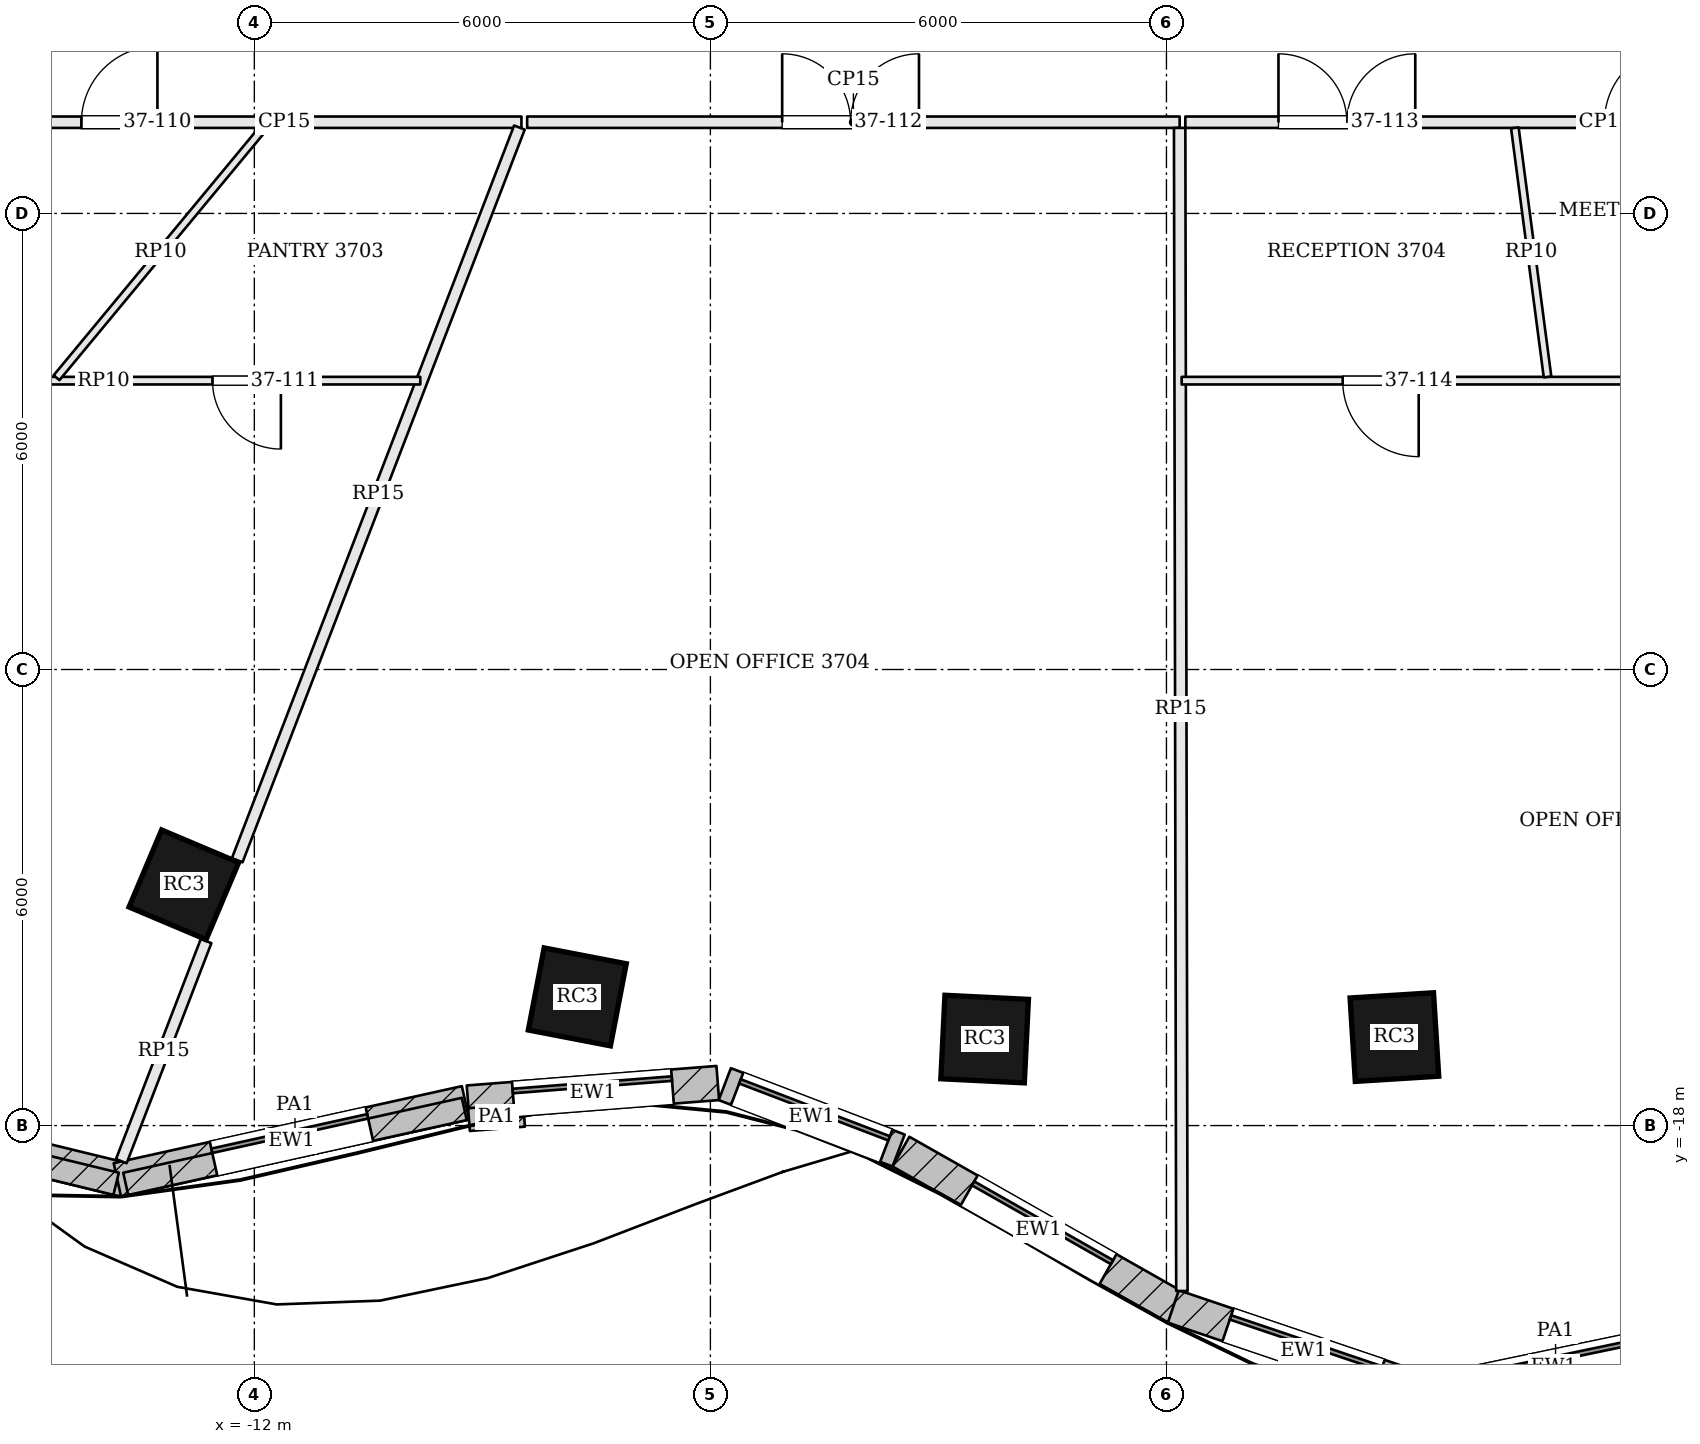
"""IFC4 building model, lengths in metres.
Left out: names, types, materials, properties, quantities, classifications, styles, units other than length and angle.
Written with IfcOpenShell. Run it as: python <this file> out.ifc"""

import sys

from ifc_helpers import new_model, si_unit, direction, frame, frame_2d, origin, origin_2d, place, context, subcontext, project, spatial, rectangle, extrude, element, fill, save


model = new_model("IFC4")
c1 = context("Model", 3, precision=1e-05, world=origin(), true_north=direction((0.0, 1.0)))
c2 = subcontext(c1, "Body", "Model", "MODEL_VIEW")
j1 = project(units=[si_unit("LENGTHUNIT", "METRE"), si_unit("PLANEANGLEUNIT", "RADIAN")], contexts=[c1])
p1 = place(None, origin())
s1 = spatial("IfcSite", under=j1, at=p1, CompositionType="ELEMENT")
p2 = place(p1, origin())
s2 = spatial("IfcBuilding", under=s1, at=p2, CompositionType="ELEMENT")
p3 = place(p2, frame((0.0, 0.0, 153.9)))
s3 = spatial("IfcBuildingStorey", under=s2, at=p3, CompositionType="ELEMENT", Elevation=153.9)
for number, where, z_axis, x_axis in (
    (1, (-12.927, -14.832, 0.0), (0.0, 0.0, 1.0), (0.921, -0.389, 0.0)),
    (2, (-7.751, -16.307, 0.0), (0.0, 0.0, 1.0), (0.982, -0.189, 0.0)),
    (3, (-2.392, -16.862, 0.0), (0.0, 0.0, 1.0), (0.999, -0.049, 0.0)),
    (4, (2.999, -16.836, 0.0), (0.0, 0.0, 1.0), (0.998, 0.062, 0.0)),
):
    element("IfcColumn", number, at=place(p3, frame(where, z_axis=z_axis, x_axis=x_axis)), inside=s3, PredefinedType="COLUMN", context=c2, shape_type="SweptSolid", body=[
        extrude(rectangle(XDim=1.1, YDim=1.1, at=origin_2d()), origin(), (0.0, 0.0, 1.0), 3.9),
    ])
p4 = place(p3, frame((-17.867, -17.701, 0.0), z_axis=(0.0, 0.0, 1.0), x_axis=(0.971546885012, -0.236847314156, 0.0)))
e5 = element("IfcWall", 5, at=p4, inside=s3, PredefinedType="SOLIDWALL", context=c2, shape_type="SweptSolid", body=[
    extrude(rectangle(XDim=4.285, YDim=0.45, at=frame_2d((2.143, 0.0))), origin(), (0.0, 0.0, 1.0), 3.7),
])
p5 = place(p4, frame((1.093, 0.0, 0.9)))
e6 = element("IfcOpeningElement", 6, at=p5, cuts=e5, PredefinedType="OPENING", context=c2, shape_type="SweptSolid", body=[
    extrude(rectangle(XDim=2.1, YDim=2.3, at=frame_2d((1.05, 1.15))), frame((0.0, 0.235, 0.0), z_axis=(0.0, -1.0, 0.0), x_axis=(1.0, 0.0, 0.0)), (0.0, 0.0, 1.0), 0.47),
])
p6 = place(p3, frame((-13.802, -18.715, 0.0), z_axis=(0.0, 0.0, 1.0), x_axis=(0.976380129166, 0.216059814331, 0.0)))
e7 = element("IfcWall", 7, at=p6, inside=s3, PredefinedType="SOLIDWALL", context=c2, shape_type="SweptSolid", body=[
    extrude(rectangle(XDim=4.692, YDim=0.45, at=frame_2d((2.346, 0.0))), origin(), (0.0, 0.0, 1.0), 3.7),
])
p7 = place(p6, frame((1.296, 0.0, 0.9)))
e8 = element("IfcOpeningElement", 8, at=p7, cuts=e7, PredefinedType="OPENING", context=c2, shape_type="SweptSolid", body=[
    extrude(rectangle(XDim=2.1, YDim=2.3, at=frame_2d((1.05, 1.15))), frame((0.0, 0.235, 0.0), z_axis=(0.0, -1.0, 0.0), x_axis=(1.0, 0.0, 0.0)), (0.0, 0.0, 1.0), 0.47),
])
p8 = place(p3, frame((-9.188, -17.697, 0.0), z_axis=(0.0, 0.0, 1.0), x_axis=(0.996964028691, 0.077863505548, 0.0)))
e9 = element("IfcWall", 9, at=p8, inside=s3, PredefinedType="SOLIDWALL", context=c2, shape_type="SweptSolid", body=[
    extrude(rectangle(XDim=3.295, YDim=0.45, at=frame_2d((1.648, 0.0))), origin(), (0.0, 0.0, 1.0), 3.7),
])
p9 = place(p8, frame((0.598, 0.0, 0.9)))
e10 = element("IfcOpeningElement", 10, at=p9, cuts=e9, PredefinedType="OPENING", context=c2, shape_type="SweptSolid", body=[
    extrude(rectangle(XDim=2.1, YDim=2.3, at=frame_2d((1.05, 1.15))), frame((0.0, 0.235, 0.0), z_axis=(0.0, -1.0, 0.0), x_axis=(1.0, 0.0, 0.0)), (0.0, 0.0, 1.0), 0.47),
])
p10 = place(p3, frame((-5.811, -17.455, 0.0), z_axis=(0.0, 0.0, 1.0), x_axis=(0.934122271306, -0.35695319336, 0.0)))
e11 = element("IfcWall", 11, at=p10, inside=s3, PredefinedType="SOLIDWALL", context=c2, shape_type="SweptSolid", body=[
    extrude(rectangle(XDim=2.448, YDim=0.45, at=frame_2d((1.224, 0.0))), origin(), (0.0, 0.0, 1.0), 3.7),
])
p11 = place(p10, frame((0.174, 0.0, 0.9)))
e12 = element("IfcOpeningElement", 12, at=p11, cuts=e11, PredefinedType="OPENING", context=c2, shape_type="SweptSolid", body=[
    extrude(rectangle(XDim=2.1, YDim=2.3, at=frame_2d((1.05, 1.15))), frame((0.0, 0.235, 0.0), z_axis=(0.0, -1.0, 0.0), x_axis=(1.0, 0.0, 0.0)), (0.0, 0.0, 1.0), 0.47),
])
p12 = place(p3, frame((-3.493, -18.343, 0.0), z_axis=(0.0, 0.0, 1.0), x_axis=(0.869825988853, -0.493358641473, 0.0)))
e13 = element("IfcWall", 13, at=p12, inside=s3, PredefinedType="SOLIDWALL", context=c2, shape_type="SweptSolid", body=[
    extrude(rectangle(XDim=4.165, YDim=0.45, at=frame_2d((2.083, 0.0))), origin(), (0.0, 0.0, 1.0), 3.7),
])
p13 = place(p12, frame((1.032, 0.0, 0.9)))
e14 = element("IfcOpeningElement", 14, at=p13, cuts=e13, PredefinedType="OPENING", context=c2, shape_type="SweptSolid", body=[
    extrude(rectangle(XDim=2.1, YDim=2.3, at=frame_2d((1.05, 1.15))), frame((0.0, 0.235, 0.0), z_axis=(0.0, -1.0, 0.0), x_axis=(1.0, 0.0, 0.0)), (0.0, 0.0, 1.0), 0.47),
])
p14 = place(p3, frame((0.091, -20.38, 0.0), z_axis=(0.0, 0.0, 1.0), x_axis=(0.947304227221, -0.320335294791, 0.0)))
e15 = element("IfcWall", 15, at=p14, inside=s3, PredefinedType="SOLIDWALL", context=c2, shape_type="SweptSolid", body=[
    extrude(rectangle(XDim=3.617, YDim=0.45, at=frame_2d((1.809, 0.0))), origin(), (0.0, 0.0, 1.0), 3.7),
])
p15 = place(p14, frame((0.759, 0.0, 0.9)))
e16 = element("IfcOpeningElement", 16, at=p15, cuts=e15, PredefinedType="OPENING", context=c2, shape_type="SweptSolid", body=[
    extrude(rectangle(XDim=2.1, YDim=2.3, at=frame_2d((1.05, 1.15))), frame((0.0, 0.235, 0.0), z_axis=(0.0, -1.0, 0.0), x_axis=(1.0, 0.0, 0.0)), (0.0, 0.0, 1.0), 0.47),
])
p16 = place(p3, frame((3.399, -21.532, 0.0), z_axis=(0.0, 0.0, 1.0), x_axis=(0.978915912181, 0.204263645512, 0.0)))
e17 = element("IfcWall", 17, at=p16, inside=s3, PredefinedType="SOLIDWALL", context=c2, shape_type="SweptSolid", body=[
    extrude(rectangle(XDim=3.466, YDim=0.45, at=frame_2d((1.733, 0.0))), origin(), (0.0, 0.0, 1.0), 3.7),
])
p17 = place(p16, frame((0.683, 0.0, 0.9)))
e18 = element("IfcOpeningElement", 18, at=p17, cuts=e17, PredefinedType="OPENING", context=c2, shape_type="SweptSolid", body=[
    extrude(rectangle(XDim=2.1, YDim=2.3, at=frame_2d((1.05, 1.15))), frame((0.0, 0.235, 0.0), z_axis=(0.0, -1.0, 0.0), x_axis=(1.0, 0.0, 0.0)), (0.0, 0.0, 1.0), 0.47),
])
p18 = place(p3, frame((-16.76, -18.049, 3.9), z_axis=(0.0, 0.0, 1.0), x_axis=(0.971548856787, -0.236839225795, 0.0)))
e19 = element("IfcWall", 19, at=p18, inside=s3, PredefinedType="PARAPET", context=c2, shape_type="SweptSolid", body=[
    extrude(rectangle(XDim=3.028, YDim=0.3, at=frame_2d((1.514, 0.0))), origin(), (0.0, 0.0, 1.0), 1.1),
])
p19 = place(p3, frame((-13.692, -18.767, 3.9), z_axis=(0.0, 0.0, 1.0), x_axis=(0.976379349899, 0.21606333583, 0.0)))
e20 = element("IfcWall", 20, at=p19, inside=s3, PredefinedType="PARAPET", context=c2, shape_type="SweptSolid", body=[
    extrude(rectangle(XDim=4.562, YDim=0.3, at=frame_2d((2.281, 0.0))), origin(), (0.0, 0.0, 1.0), 1.1),
])
p20 = place(p3, frame((-9.176, -17.921, 3.9), z_axis=(0.0, 0.0, 1.0), x_axis=(0.996986943463, 0.077569546628, 0.0)))
e21 = element("IfcWall", 21, at=p20, inside=s3, PredefinedType="PARAPET", context=c2, shape_type="SweptSolid", body=[
    extrude(rectangle(XDim=0.727, YDim=0.3, at=frame_2d((0.364, 0.0))), origin(), (0.0, 0.0, 1.0), 1.1),
])
p21 = place(p3, frame((3.524, -21.582, 3.9), z_axis=(0.0, 0.0, 1.0), x_axis=(0.97891618591, 0.204262333689, 0.0)))
e22 = element("IfcWall", 22, at=p21, inside=s3, PredefinedType="PARAPET", context=c2, shape_type="SweptSolid", body=[
    extrude(rectangle(XDim=3.259, YDim=0.3, at=frame_2d((1.63, 0.0))), origin(), (0.0, 0.0, 1.0), 1.1),
])
p22 = place(p3, frame((-14.725, -4.8, 0.0), z_axis=(0.0, 0.0, 1.0), x_axis=(1.0, 0.0, 0.0)))
e23 = element("IfcWall", 23, at=p22, inside=s3, PredefinedType="PARTITIONING", context=c2, shape_type="SweptSolid", body=[
    extrude(rectangle(XDim=6.24, YDim=0.15, at=frame_2d((3.12, 0.0))), origin(), (0.0, 0.0, 1.0), 3.198),
])
p23 = place(p22, frame((0.45, 0.0, 0.0)))
e24 = element("IfcOpeningElement", 24, at=p23, cuts=e23, PredefinedType="OPENING", context=c2, shape_type="SweptSolid", body=[
    extrude(rectangle(XDim=1.0, YDim=2.4, at=frame_2d((0.5, 1.2))), frame((0.0, 0.085, 0.0), z_axis=(0.0, -1.0, 0.0), x_axis=(1.0, 0.0, 0.0)), (0.0, 0.0, 1.0), 0.17),
])
p24 = place(p3, frame((-13.75, -18.469, 0.0), z_axis=(0.0, 0.0, 1.0), x_axis=(0.359395543855, 0.933185320854, 0.0)))
e25 = element("IfcWall", 25, at=p24, inside=s3, PredefinedType="PARTITIONING", context=c2, shape_type="SweptSolid", body=[
    extrude(rectangle(XDim=3.103, YDim=0.15, at=frame_2d((1.552, 0.0))), origin(), (0.0, 0.0, 1.0), 3.198),
])
p25 = place(p3, frame((-12.225, -14.51, 0.0), z_axis=(0.0, 0.0, 1.0), x_axis=(0.359408237085, 0.93318043224, 0.0)))
e26 = element("IfcWall", 26, at=p25, inside=s3, PredefinedType="PARTITIONING", context=c2, shape_type="SweptSolid", body=[
    extrude(rectangle(XDim=10.33, YDim=0.15, at=frame_2d((5.165, 0.0))), origin(), (0.0, 0.0, 1.0), 3.198),
])
p26 = place(p3, frame((-8.411, -4.8, 0.0), z_axis=(0.0, 0.0, 1.0), x_axis=(1.0, 0.0, 0.0)))
e27 = element("IfcWall", 27, at=p26, inside=s3, PredefinedType="PARTITIONING", context=c2, shape_type="SweptSolid", body=[
    extrude(rectangle(XDim=8.584, YDim=0.15, at=frame_2d((4.292, 0.0))), origin(), (0.0, 0.0, 1.0), 3.198),
])
p27 = place(p26, frame((3.355, 0.0, 0.0)))
e28 = element("IfcOpeningElement", 28, at=p27, cuts=e27, PredefinedType="OPENING", context=c2, shape_type="SweptSolid", body=[
    extrude(rectangle(XDim=1.8, YDim=2.1, at=frame_2d((0.9, 1.05))), frame((0.0, 0.085, 0.0), z_axis=(0.0, -1.0, 0.0), x_axis=(1.0, 0.0, 0.0)), (0.0, 0.0, 1.0), 0.17),
])
p28 = place(p3, frame((0.203, -20.176, 0.0), z_axis=(0.0, 0.0, 1.0), x_axis=(-0.001930652346, 0.999998136289, 0.0)))
e29 = element("IfcWall", 29, at=p28, inside=s3, PredefinedType="PARTITIONING", context=c2, shape_type="SweptSolid", body=[
    extrude(rectangle(XDim=15.301, YDim=0.15, at=frame_2d((7.65, 0.0))), origin(), (0.0, 0.0, 1.0), 3.198),
])
p29 = place(p3, frame((0.249, -4.8, 0.0), z_axis=(0.0, 0.0, 1.0), x_axis=(1.0, 0.0, 0.0)))
e30 = element("IfcWall", 30, at=p29, inside=s3, PredefinedType="PARTITIONING", context=c2, shape_type="SweptSolid", body=[
    extrude(rectangle(XDim=11.643, YDim=0.15, at=frame_2d((5.822, 0.0))), origin(), (0.0, 0.0, 1.0), 3.198),
])
p30 = place(p29, frame((1.225, 0.0, 0.0)))
e31 = element("IfcOpeningElement", 31, at=p30, cuts=e30, PredefinedType="OPENING", context=c2, shape_type="SweptSolid", body=[
    extrude(rectangle(XDim=1.8, YDim=2.1, at=frame_2d((0.9, 1.05))), frame((0.0, 0.085, 0.0), z_axis=(0.0, -1.0, 0.0), x_axis=(1.0, 0.0, 0.0)), (0.0, 0.0, 1.0), 0.17),
])
p31 = place(p29, frame((5.513, 0.0, 0.0)))
e32 = element("IfcOpeningElement", 32, at=p31, cuts=e30, PredefinedType="OPENING", context=c2, shape_type="SweptSolid", body=[
    extrude(rectangle(XDim=1.0, YDim=2.4, at=frame_2d((0.5, 1.2))), frame((0.0, 0.085, 0.0), z_axis=(0.0, -1.0, 0.0), x_axis=(1.0, 0.0, 0.0)), (0.0, 0.0, 1.0), 0.17),
])
p32 = place(p3, frame((-9.817, -8.2, 0.0), z_axis=(0.0, 0.0, 1.0), x_axis=(-1.0, 0.0, 0.0)))
e33 = element("IfcWall", 33, at=p32, inside=s3, PredefinedType="PARTITIONING", context=c2, shape_type="SweptSolid", body=[
    extrude(rectangle(XDim=8.333, YDim=0.1, at=frame_2d((4.167, 0.0))), origin(), (0.0, 0.0, 1.0), 3.184),
])
p33 = place(p32, frame((1.834, 0.0, 0.0)))
e34 = element("IfcOpeningElement", 34, at=p33, cuts=e33, PredefinedType="OPENING", context=c2, shape_type="SweptSolid", body=[
    extrude(rectangle(XDim=0.9, YDim=2.1, at=frame_2d((0.45, 1.05))), frame((0.0, 0.06, 0.0), z_axis=(0.0, -1.0, 0.0), x_axis=(1.0, 0.0, 0.0)), (0.0, 0.0, 1.0), 0.12),
])
p34 = place(p3, frame((-11.865, -4.858, 0.0), z_axis=(0.0, 0.0, 1.0), x_axis=(-0.638010152626, -0.770027950886, 0.0)))
e35 = element("IfcWall", 35, at=p34, inside=s3, PredefinedType="PARTITIONING", context=c2, shape_type="SweptSolid", body=[
    extrude(rectangle(XDim=4.29, YDim=0.1, at=frame_2d((2.145, 0.0))), origin(), (0.0, 0.0, 1.0), 3.184),
])
p35 = place(p3, frame((14.823, -8.2, 0.0), z_axis=(0.0, 0.0, 1.0), x_axis=(-1.0, 0.0, 0.0)))
e36 = element("IfcWall", 36, at=p35, inside=s3, PredefinedType="PARTITIONING", context=c2, shape_type="SweptSolid", body=[
    extrude(rectangle(XDim=14.622, YDim=0.1, at=frame_2d((7.311, 0.0))), origin(), (0.0, 0.0, 1.0), 3.184),
])
p36 = place(p35, frame((11.504, 0.0, 0.0)))
e37 = element("IfcOpeningElement", 37, at=p36, cuts=e36, PredefinedType="OPENING", context=c2, shape_type="SweptSolid", body=[
    extrude(rectangle(XDim=1.0, YDim=2.1, at=frame_2d((0.5, 1.05))), frame((0.0, 0.06, 0.0), z_axis=(0.0, -1.0, 0.0), x_axis=(1.0, 0.0, 0.0)), (0.0, 0.0, 1.0), 0.12),
])
p37 = place(p35, frame((2.118, 0.0, 0.0)))
e38 = element("IfcOpeningElement", 38, at=p37, cuts=e36, PredefinedType="OPENING", context=c2, shape_type="SweptSolid", body=[
    extrude(rectangle(XDim=0.9, YDim=2.1, at=frame_2d((0.45, 1.05))), frame((0.0, 0.06, 0.0), z_axis=(0.0, -1.0, 0.0), x_axis=(1.0, 0.0, 0.0)), (0.0, 0.0, 1.0), 0.12),
])
p38 = place(p3, frame((4.583, -4.875, 0.0), z_axis=(0.0, 0.0, 1.0), x_axis=(0.130125733959, -0.991497500431, 0.0)))
e39 = element("IfcWall", 39, at=p38, inside=s3, PredefinedType="PARTITIONING", context=c2, shape_type="SweptSolid", body=[
    extrude(rectangle(XDim=3.304, YDim=0.1, at=frame_2d((1.652, 0.0))), origin(), (0.0, 0.0, 1.0), 3.184),
])
p39 = place(p7, origin())
e40 = element("IfcWindow", 40, at=p39, inside=s3, PartitioningType="SINGLE_PANEL", PredefinedType="WINDOW", context=c2, shape_type="SweptSolid", body=[
    extrude(rectangle(XDim=2.1, YDim=2.3, at=frame_2d((1.05, 1.15))), frame((0.0, 0.135, 0.0), z_axis=(0.0, -1.0, 0.0), x_axis=(1.0, 0.0, 0.0)), (0.0, 0.0, 1.0), 0.06),
])
fill(e8, e40)
p40 = place(p9, origin())
e41 = element("IfcWindow", 41, at=p40, inside=s3, PartitioningType="SINGLE_PANEL", PredefinedType="WINDOW", context=c2, shape_type="SweptSolid", body=[
    extrude(rectangle(XDim=2.1, YDim=2.3, at=frame_2d((1.05, 1.15))), frame((0.0, 0.135, 0.0), z_axis=(0.0, -1.0, 0.0), x_axis=(1.0, 0.0, 0.0)), (0.0, 0.0, 1.0), 0.06),
])
fill(e10, e41)
p41 = place(p11, origin())
e42 = element("IfcWindow", 42, at=p41, inside=s3, PartitioningType="SINGLE_PANEL", PredefinedType="WINDOW", context=c2, shape_type="SweptSolid", body=[
    extrude(rectangle(XDim=2.1, YDim=2.3, at=frame_2d((1.05, 1.15))), frame((0.0, 0.135, 0.0), z_axis=(0.0, -1.0, 0.0), x_axis=(1.0, 0.0, 0.0)), (0.0, 0.0, 1.0), 0.06),
])
fill(e12, e42)
p42 = place(p13, origin())
e43 = element("IfcWindow", 43, at=p42, inside=s3, PartitioningType="SINGLE_PANEL", PredefinedType="WINDOW", context=c2, shape_type="SweptSolid", body=[
    extrude(rectangle(XDim=2.1, YDim=2.3, at=frame_2d((1.05, 1.15))), frame((0.0, 0.135, 0.0), z_axis=(0.0, -1.0, 0.0), x_axis=(1.0, 0.0, 0.0)), (0.0, 0.0, 1.0), 0.06),
])
fill(e14, e43)
p43 = place(p15, origin())
e44 = element("IfcWindow", 44, at=p43, inside=s3, PartitioningType="SINGLE_PANEL", PredefinedType="WINDOW", context=c2, shape_type="SweptSolid", body=[
    extrude(rectangle(XDim=2.1, YDim=2.3, at=frame_2d((1.05, 1.15))), frame((0.0, 0.135, 0.0), z_axis=(0.0, -1.0, 0.0), x_axis=(1.0, 0.0, 0.0)), (0.0, 0.0, 1.0), 0.06),
])
fill(e16, e44)
p44 = place(p17, origin())
e45 = element("IfcWindow", 45, at=p44, inside=s3, PartitioningType="SINGLE_PANEL", PredefinedType="WINDOW", context=c2, shape_type="SweptSolid", body=[
    extrude(rectangle(XDim=2.1, YDim=2.3, at=frame_2d((1.05, 1.15))), frame((0.0, 0.135, 0.0), z_axis=(0.0, -1.0, 0.0), x_axis=(1.0, 0.0, 0.0)), (0.0, 0.0, 1.0), 0.06),
])
fill(e18, e45)
p45 = place(p23, origin())
e46 = element("IfcDoor", 46, at=p45, inside=s3, OperationType="SINGLE_SWING_RIGHT", PredefinedType="DOOR", context=c2, shape_type="SweptSolid", body=[
    extrude(rectangle(XDim=1.0, YDim=2.4, at=frame_2d((0.5, 1.2))), frame((0.0, 0.025, 0.0), z_axis=(0.0, -1.0, 0.0), x_axis=(1.0, 0.0, 0.0)), (0.0, 0.0, 1.0), 0.05),
])
fill(e24, e46)
p46 = place(p33, origin())
e47 = element("IfcDoor", 47, at=p46, inside=s3, OperationType="SINGLE_SWING_LEFT", PredefinedType="DOOR", context=c2, shape_type="SweptSolid", body=[
    extrude(rectangle(XDim=0.9, YDim=2.1, at=frame_2d((0.45, 1.05))), frame((0.0, 0.025, 0.0), z_axis=(0.0, -1.0, 0.0), x_axis=(1.0, 0.0, 0.0)), (0.0, 0.0, 1.0), 0.05),
])
fill(e34, e47)
p47 = place(p27, origin())
e48 = element("IfcDoor", 48, at=p47, inside=s3, OperationType="DOUBLE_DOOR_SINGLE_SWING", PredefinedType="DOOR", context=c2, shape_type="SweptSolid", body=[
    extrude(rectangle(XDim=1.8, YDim=2.1, at=frame_2d((0.9, 1.05))), frame((0.0, 0.025, 0.0), z_axis=(0.0, -1.0, 0.0), x_axis=(1.0, 0.0, 0.0)), (0.0, 0.0, 1.0), 0.05),
])
fill(e28, e48)
p48 = place(p30, origin())
e49 = element("IfcDoor", 49, at=p48, inside=s3, OperationType="DOUBLE_DOOR_SINGLE_SWING", PredefinedType="DOOR", context=c2, shape_type="SweptSolid", body=[
    extrude(rectangle(XDim=1.8, YDim=2.1, at=frame_2d((0.9, 1.05))), frame((0.0, 0.025, 0.0), z_axis=(0.0, -1.0, 0.0), x_axis=(1.0, 0.0, 0.0)), (0.0, 0.0, 1.0), 0.05),
])
fill(e31, e49)
p49 = place(p36, origin())
e50 = element("IfcDoor", 50, at=p49, inside=s3, OperationType="SINGLE_SWING_LEFT", PredefinedType="DOOR", context=c2, shape_type="SweptSolid", body=[
    extrude(rectangle(XDim=1.0, YDim=2.1, at=frame_2d((0.5, 1.05))), frame((0.0, 0.025, 0.0), z_axis=(0.0, -1.0, 0.0), x_axis=(1.0, 0.0, 0.0)), (0.0, 0.0, 1.0), 0.05),
])
fill(e37, e50)
p50 = place(p31, origin())
e51 = element("IfcDoor", 51, at=p50, inside=s3, OperationType="SINGLE_SWING_RIGHT", PredefinedType="DOOR", context=c2, shape_type="SweptSolid", body=[
    extrude(rectangle(XDim=1.0, YDim=2.4, at=frame_2d((0.5, 1.2))), frame((0.0, 0.025, 0.0), z_axis=(0.0, -1.0, 0.0), x_axis=(1.0, 0.0, 0.0)), (0.0, 0.0, 1.0), 0.05),
])
fill(e32, e51)
save(model, sys.argv[1])
